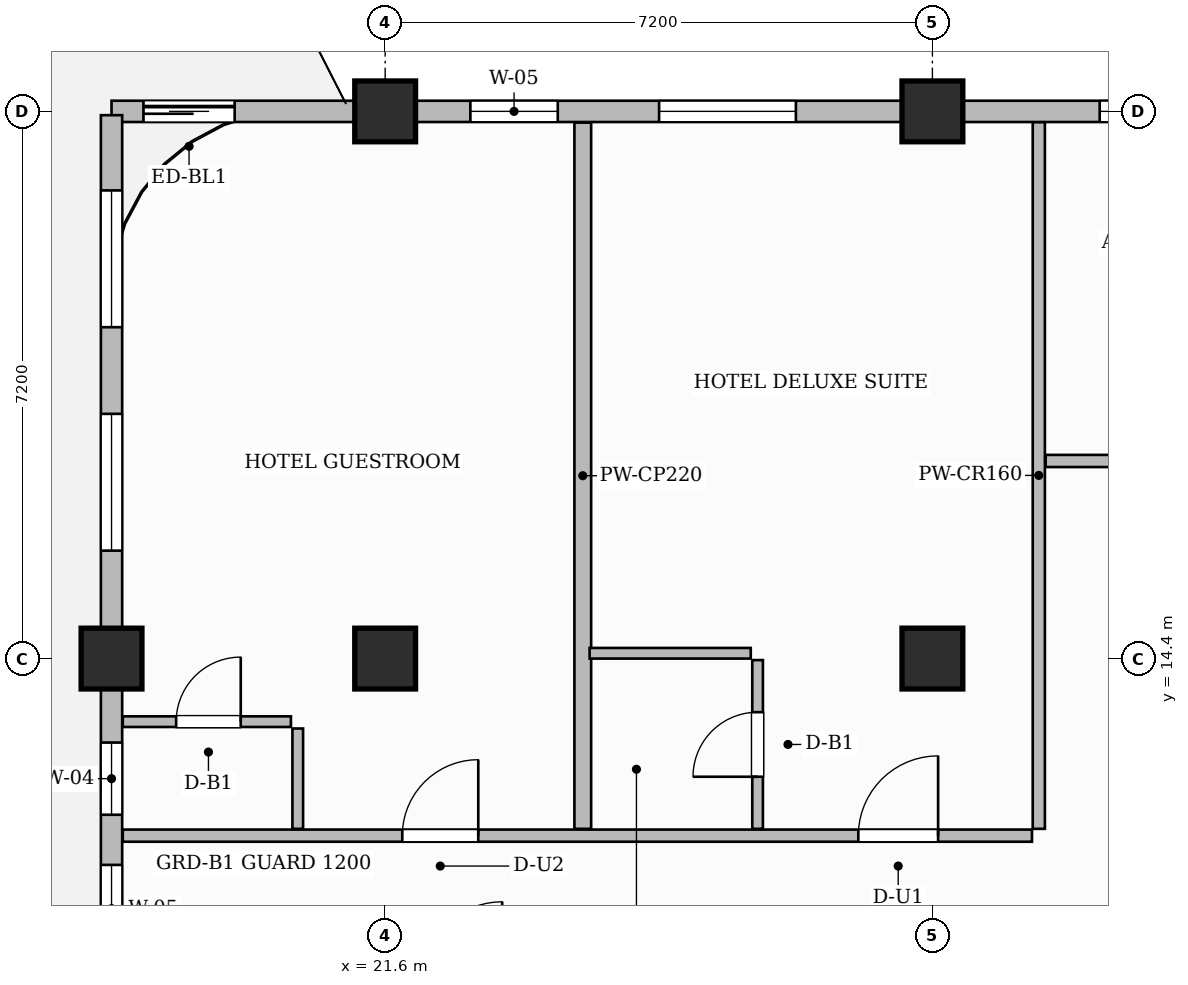
"""IFC4 building model, lengths in metres.
Left out: names, types, materials, properties, quantities, classifications, styles, units other than length and angle.
Written with IfcOpenShell. Run it as: python <this file> out.ifc"""

import sys

from ifc_helpers import new_model, si_unit, direction, frame, frame_2d, origin, origin_2d, place, context, subcontext, project, spatial, rectangle, extrude, source, transform, mapped, element, fill, save


model = new_model("IFC4")
c1 = context("Model", 3, precision=1e-05, world=origin(), true_north=direction((0.0, 1.0)))
c2 = subcontext(c1, "Body", "Model", "MODEL_VIEW")
j1 = project(units=[si_unit("LENGTHUNIT", "METRE"), si_unit("PLANEANGLEUNIT", "RADIAN")], contexts=[c1])
p1 = place(None, origin())
s1 = spatial("IfcSite", under=j1, at=p1, CompositionType="ELEMENT")
p2 = place(p1, origin())
s2 = spatial("IfcBuilding", under=s1, at=p2, CompositionType="ELEMENT")
p3 = place(p2, frame((0.0, 0.0, 259.65)))
s3 = spatial("IfcBuildingStorey", under=s2, at=p3, CompositionType="ELEMENT", Elevation=259.65)
m1 = source(origin(), c2, "Body", "SweptSolid", [
    extrude(rectangle(XDim=0.8, YDim=0.8, at=origin_2d()), origin(), (0.0, 0.0, 1.0), 3.85),
])
for number, where, z_axis, x_axis in (
    (1, (21.6, 14.4, 0.0), (0.0, 0.0, 1.0), (1.0, 0.0, 0.0)),
    (2, (21.6, 21.6, 0.0), (0.0, 0.0, 1.0), (1.0, 0.0, 0.0)),
    (3, (28.8, 14.4, 0.0), (0.0, 0.0, 1.0), (1.0, 0.0, 0.0)),
    (4, (28.8, 21.6, 0.0), (0.0, 0.0, 1.0), (1.0, 0.0, 0.0)),
    (5, (18.0, 14.4, 0.0), (0.0, 0.0, 1.0), (1.0, 0.0, 0.0)),
):
    element("IfcColumn", number, at=place(p3, frame(where, z_axis=z_axis, x_axis=x_axis)), inside=s3, PredefinedType="COLUMN", context=c2, shape_type="MappedRepresentation", body=[
        mapped(m1, transform((0.0, 0.0, 0.0), scale=1.0)),
    ])
p4 = place(p3, frame((18.148, 12.07, 0.0), z_axis=(0.0, 0.0, 1.0), x_axis=(1.0, 0.0, 0.0)))
e6 = element("IfcWall", 6, at=p4, inside=s3, PredefinedType="PARTITIONING", context=c2, shape_type="SweptSolid", body=[
    extrude(rectangle(XDim=11.962, YDim=0.16, at=frame_2d((5.981, 0.0))), origin(), (0.0, 0.0, 1.0), 3.6),
])
p5 = place(p4, frame((3.677, 0.0, 0.0)))
e7 = element("IfcOpeningElement", 7, at=p5, cuts=e6, PredefinedType="OPENING", context=c2, shape_type="SweptSolid", body=[
    extrude(rectangle(XDim=1.0, YDim=2.2, at=frame_2d((0.5, 1.1))), frame((0.0, 0.09, 0.0), z_axis=(0.0, -1.0, 0.0), x_axis=(1.0, 0.0, 0.0)), (0.0, 0.0, 1.0), 0.18),
])
p6 = place(p4, frame((9.677, 0.0, 0.0)))
e8 = element("IfcOpeningElement", 8, at=p6, cuts=e6, PredefinedType="OPENING", context=c2, shape_type="SweptSolid", body=[
    extrude(rectangle(XDim=1.05, YDim=2.25, at=frame_2d((0.525, 1.125))), frame((0.0, 0.09, 0.0), z_axis=(0.0, -1.0, 0.0), x_axis=(1.0, 0.0, 0.0)), (0.0, 0.0, 1.0), 0.18),
])
p7 = place(p3, frame((30.2, 12.16, 0.0), z_axis=(0.0, 0.0, 1.0), x_axis=(0.0, 1.0, 0.0)))
e9 = element("IfcWall", 9, at=p7, inside=s3, PredefinedType="PARTITIONING", context=c2, shape_type="SweptSolid", body=[
    extrude(rectangle(XDim=9.3, YDim=0.16, at=frame_2d((4.65, 0.0))), origin(), (0.0, 0.0, 1.0), 3.6),
])
p8 = place(p3, frame((30.29, 17.0, 0.0), z_axis=(0.0, 0.0, 1.0), x_axis=(1.0, 0.0, 0.0)))
e10 = element("IfcWall", 10, at=p8, inside=s3, PredefinedType="PARTITIONING", context=c2, shape_type="SweptSolid", body=[
    extrude(rectangle(XDim=19.37, YDim=0.16, at=frame_2d((9.685, 0.0))), origin(), (0.0, 0.0, 1.0), 3.6),
])
p9 = place(p8, frame((1.185, 0.0, 0.0)))
e11 = element("IfcOpeningElement", 11, at=p9, cuts=e10, PredefinedType="OPENING", context=c2, shape_type="SweptSolid", body=[
    extrude(rectangle(XDim=0.85, YDim=2.1, at=frame_2d((0.425, 1.05))), frame((0.0, 0.09, 0.0), z_axis=(0.0, -1.0, 0.0), x_axis=(1.0, 0.0, 0.0)), (0.0, 0.0, 1.0), 0.18),
])
p10 = place(p8, frame((6.66, 0.0, 0.0)))
e12 = element("IfcOpeningElement", 12, at=p10, cuts=e10, PredefinedType="OPENING", context=c2, shape_type="SweptSolid", body=[
    extrude(rectangle(XDim=0.9, YDim=2.15, at=frame_2d((0.45, 1.075))), frame((0.0, 0.09, 0.0), z_axis=(0.0, -1.0, 0.0), x_axis=(1.0, 0.0, 0.0)), (0.0, 0.0, 1.0), 0.18),
])
p11 = place(p8, frame((14.46, 0.0, 0.0)))
e13 = element("IfcOpeningElement", 13, at=p11, cuts=e10, PredefinedType="OPENING", context=c2, shape_type="SweptSolid", body=[
    extrude(rectangle(XDim=1.4, YDim=2.35, at=frame_2d((0.7, 1.175))), frame((0.0, 0.09, 0.0), z_axis=(0.0, -1.0, 0.0), x_axis=(1.0, 0.0, 0.0)), (0.0, 0.0, 1.0), 0.18),
])
p12 = place(p3, frame((24.2, 12.16, 0.0), z_axis=(0.0, 0.0, 1.0), x_axis=(0.0, 1.0, 0.0)))
e14 = element("IfcWall", 14, at=p12, inside=s3, PredefinedType="PARTITIONING", context=c2, shape_type="SweptSolid", body=[
    extrude(rectangle(XDim=9.292, YDim=0.22, at=frame_2d((4.646, 0.0))), origin(), (0.0, 0.0, 1.0), 3.6),
])
p13 = place(p3, frame((20.45, 12.16, 0.0), z_axis=(0.0, 0.0, 1.0), x_axis=(0.0, 1.0, 0.0)))
e15 = element("IfcWall", 15, at=p13, inside=s3, PredefinedType="PARTITIONING", context=c2, shape_type="SweptSolid", body=[
    extrude(rectangle(XDim=1.32, YDim=0.14, at=frame_2d((0.66, 0.0))), origin(), (0.0, 0.0, 1.0), 3.6),
])
p14 = place(p3, frame((18.148, 13.57, 0.0), z_axis=(0.0, 0.0, 1.0), x_axis=(1.0, 0.0, 0.0)))
e16 = element("IfcWall", 16, at=p14, inside=s3, PredefinedType="PARTITIONING", context=c2, shape_type="SweptSolid", body=[
    extrude(rectangle(XDim=2.212, YDim=0.14, at=frame_2d((1.106, 0.0))), origin(), (0.0, 0.0, 1.0), 3.6),
])
p15 = place(p14, frame((0.702, 0.0, 0.0)))
e17 = element("IfcOpeningElement", 17, at=p15, cuts=e16, PredefinedType="OPENING", context=c2, shape_type="SweptSolid", body=[
    extrude(rectangle(XDim=0.85, YDim=2.1, at=frame_2d((0.425, 1.05))), frame((0.0, 0.08, 0.0), z_axis=(0.0, -1.0, 0.0), x_axis=(1.0, 0.0, 0.0)), (0.0, 0.0, 1.0), 0.16),
])
p16 = place(p3, frame((26.5, 12.16, 0.0), z_axis=(0.0, 0.0, 1.0), x_axis=(0.0, 1.0, 0.0)))
e18 = element("IfcWall", 18, at=p16, inside=s3, PredefinedType="PARTITIONING", context=c2, shape_type="SweptSolid", body=[
    extrude(rectangle(XDim=2.22, YDim=0.14, at=frame_2d((1.11, 0.0))), origin(), (0.0, 0.0, 1.0), 3.6),
])
p17 = place(p16, frame((0.685, 0.0, 0.0)))
e19 = element("IfcOpeningElement", 19, at=p17, cuts=e18, PredefinedType="OPENING", context=c2, shape_type="SweptSolid", body=[
    extrude(rectangle(XDim=0.85, YDim=2.1, at=frame_2d((0.425, 1.05))), frame((0.0, 0.08, 0.0), z_axis=(0.0, -1.0, 0.0), x_axis=(1.0, 0.0, 0.0)), (0.0, 0.0, 1.0), 0.16),
])
p18 = place(p3, frame((24.29, 14.47, 0.0), z_axis=(0.0, 0.0, 1.0), x_axis=(1.0, 0.0, 0.0)))
e20 = element("IfcWall", 20, at=p18, inside=s3, PredefinedType="PARTITIONING", context=c2, shape_type="SweptSolid", body=[
    extrude(rectangle(XDim=2.12, YDim=0.14, at=frame_2d((1.06, 0.0))), origin(), (0.0, 0.0, 1.0), 3.185),
])
p19 = place(p3, frame((18.0, 21.6, 0.0), z_axis=(0.0, 0.0, 1.0), x_axis=(1.0, 0.0, 0.0)))
e21 = element("IfcWall", 21, at=p19, inside=s3, PredefinedType="SOLIDWALL", context=c2, shape_type="SweptSolid", body=[
    extrude(rectangle(XDim=31.8, YDim=0.28, at=frame_2d((15.9, 0.0))), origin(), (0.0, 0.0, 1.0), 3.185),
])
p20 = place(p19, frame((0.42, 0.0, 0.0)))
e22 = element("IfcOpeningElement", 22, at=p20, cuts=e21, PredefinedType="OPENING", context=c2, shape_type="SweptSolid", body=[
    extrude(rectangle(XDim=1.2, YDim=2.2, at=frame_2d((0.6, 1.1))), frame((0.0, 0.15, 0.0), z_axis=(0.0, -1.0, 0.0), x_axis=(1.0, 0.0, 0.0)), (0.0, 0.0, 1.0), 0.3),
])
p21 = place(p19, frame((4.721, 0.0, 0.8)))
e23 = element("IfcOpeningElement", 23, at=p21, cuts=e21, PredefinedType="OPENING", context=c2, shape_type="SweptSolid", body=[
    extrude(rectangle(XDim=1.15, YDim=1.8, at=frame_2d((0.575, 0.9))), frame((0.0, 0.15, 0.0), z_axis=(0.0, -1.0, 0.0), x_axis=(1.0, 0.0, 0.0)), (0.0, 0.0, 1.0), 0.3),
])
p22 = place(p19, frame((7.204, 0.0, 0.8)))
e24 = element("IfcOpeningElement", 24, at=p22, cuts=e21, PredefinedType="OPENING", context=c2, shape_type="SweptSolid", body=[
    extrude(rectangle(XDim=1.8, YDim=1.85, at=frame_2d((0.9, 0.925))), frame((0.0, 0.15, 0.0), z_axis=(0.0, -1.0, 0.0), x_axis=(1.0, 0.0, 0.0)), (0.0, 0.0, 1.0), 0.3),
])
p23 = place(p19, frame((13.001, 0.0, 0.8)))
e25 = element("IfcOpeningElement", 25, at=p23, cuts=e21, PredefinedType="OPENING", context=c2, shape_type="SweptSolid", body=[
    extrude(rectangle(XDim=1.8, YDim=1.85, at=frame_2d((0.9, 0.925))), frame((0.0, 0.15, 0.0), z_axis=(0.0, -1.0, 0.0), x_axis=(1.0, 0.0, 0.0)), (0.0, 0.0, 1.0), 0.3),
])
p24 = place(p19, frame((18.123, 0.0, 0.8)))
e26 = element("IfcOpeningElement", 26, at=p24, cuts=e21, PredefinedType="OPENING", context=c2, shape_type="SweptSolid", body=[
    extrude(rectangle(XDim=1.8, YDim=1.85, at=frame_2d((0.9, 0.925))), frame((0.0, 0.15, 0.0), z_axis=(0.0, -1.0, 0.0), x_axis=(1.0, 0.0, 0.0)), (0.0, 0.0, 1.0), 0.3),
])
p25 = place(p19, frame((20.869, 0.0, 0.8)))
e27 = element("IfcOpeningElement", 27, at=p25, cuts=e21, PredefinedType="OPENING", context=c2, shape_type="SweptSolid", body=[
    extrude(rectangle(XDim=1.8, YDim=1.85, at=frame_2d((0.9, 0.925))), frame((0.0, 0.15, 0.0), z_axis=(0.0, -1.0, 0.0), x_axis=(1.0, 0.0, 0.0)), (0.0, 0.0, 1.0), 0.3),
])
p26 = place(p19, frame((25.475, 0.0, 0.8)))
e28 = element("IfcOpeningElement", 28, at=p26, cuts=e21, PredefinedType="OPENING", context=c2, shape_type="SweptSolid", body=[
    extrude(rectangle(XDim=1.8, YDim=1.85, at=frame_2d((0.9, 0.925))), frame((0.0, 0.15, 0.0), z_axis=(0.0, -1.0, 0.0), x_axis=(1.0, 0.0, 0.0)), (0.0, 0.0, 1.0), 0.3),
])
p27 = place(p19, frame((28.525, 0.0, 0.8)))
e29 = element("IfcOpeningElement", 29, at=p27, cuts=e21, PredefinedType="OPENING", context=c2, shape_type="SweptSolid", body=[
    extrude(rectangle(XDim=1.8, YDim=1.85, at=frame_2d((0.9, 0.925))), frame((0.0, 0.15, 0.0), z_axis=(0.0, -1.0, 0.0), x_axis=(1.0, 0.0, 0.0)), (0.0, 0.0, 1.0), 0.3),
])
p28 = place(p3, frame((18.0, 0.05, 0.0), z_axis=(0.0, 0.0, 1.0), x_axis=(0.0, 1.0, 0.0)))
e30 = element("IfcWall", 30, at=p28, inside=s3, PredefinedType="SOLIDWALL", context=c2, shape_type="SweptSolid", body=[
    extrude(rectangle(XDim=21.5, YDim=0.28, at=frame_2d((10.75, 0.0))), origin(), (0.0, 0.0, 1.0), 3.6),
])
p29 = place(p28, frame((1.831, 0.0, 0.8)))
e31 = element("IfcOpeningElement", 31, at=p29, cuts=e30, PredefinedType="OPENING", context=c2, shape_type="SweptSolid", body=[
    extrude(rectangle(XDim=1.8, YDim=1.85, at=frame_2d((0.9, 0.925))), frame((0.0, 0.15, 0.0), z_axis=(0.0, -1.0, 0.0), x_axis=(1.0, 0.0, 0.0)), (0.0, 0.0, 1.0), 0.3),
])
p30 = place(p28, frame((8.321, 0.0, 0.8)))
e32 = element("IfcOpeningElement", 32, at=p30, cuts=e30, PredefinedType="OPENING", context=c2, shape_type="SweptSolid", body=[
    extrude(rectangle(XDim=1.4, YDim=1.85, at=frame_2d((0.7, 0.925))), frame((0.0, 0.15, 0.0), z_axis=(0.0, -1.0, 0.0), x_axis=(1.0, 0.0, 0.0)), (0.0, 0.0, 1.0), 0.3),
])
p31 = place(p28, frame((10.485, 0.0, 0.8)))
e33 = element("IfcOpeningElement", 33, at=p31, cuts=e30, PredefinedType="OPENING", context=c2, shape_type="SweptSolid", body=[
    extrude(rectangle(XDim=1.15, YDim=1.8, at=frame_2d((0.575, 0.9))), frame((0.0, 0.15, 0.0), z_axis=(0.0, -1.0, 0.0), x_axis=(1.0, 0.0, 0.0)), (0.0, 0.0, 1.0), 0.3),
])
p32 = place(p28, frame((12.295, 0.0, 0.8)))
e34 = element("IfcOpeningElement", 34, at=p32, cuts=e30, PredefinedType="OPENING", context=c2, shape_type="SweptSolid", body=[
    extrude(rectangle(XDim=0.95, YDim=1.75, at=frame_2d((0.475, 0.875))), frame((0.0, 0.15, 0.0), z_axis=(0.0, -1.0, 0.0), x_axis=(1.0, 0.0, 0.0)), (0.0, 0.0, 1.0), 0.3),
])
p33 = place(p28, frame((15.77, 0.0, 0.8)))
e35 = element("IfcOpeningElement", 35, at=p33, cuts=e30, PredefinedType="OPENING", context=c2, shape_type="SweptSolid", body=[
    extrude(rectangle(XDim=1.8, YDim=1.85, at=frame_2d((0.9, 0.925))), frame((0.0, 0.15, 0.0), z_axis=(0.0, -1.0, 0.0), x_axis=(1.0, 0.0, 0.0)), (0.0, 0.0, 1.0), 0.3),
])
p34 = place(p28, frame((18.71, 0.0, 0.8)))
e36 = element("IfcOpeningElement", 36, at=p34, cuts=e30, PredefinedType="OPENING", context=c2, shape_type="SweptSolid", body=[
    extrude(rectangle(XDim=1.8, YDim=1.85, at=frame_2d((0.9, 0.925))), frame((0.0, 0.15, 0.0), z_axis=(0.0, -1.0, 0.0), x_axis=(1.0, 0.0, 0.0)), (0.0, 0.0, 1.0), 0.3),
])
m2 = source(origin(), c2, "Body", "SweptSolid", [
    extrude(rectangle(XDim=0.85, YDim=2.1, at=frame_2d((0.425, 1.05))), frame((0.0, 0.025, 0.0), z_axis=(0.0, -1.0, 0.0), x_axis=(1.0, 0.0, 0.0)), (0.0, 0.0, 1.0), 0.05),
])
p35 = place(p15, origin())
e37 = element("IfcDoor", 37, at=p35, inside=s3, OperationType="SINGLE_SWING_RIGHT", PredefinedType="DOOR", context=c2, shape_type="MappedRepresentation", body=[
    mapped(m2, transform((0.0, 0.0, 0.0), scale=1.0)),
])
fill(e17, e37)
m3 = source(origin(), c2, "Body", "SweptSolid", [
    extrude(rectangle(XDim=1.0, YDim=2.2, at=frame_2d((0.5, 1.1))), frame((0.0, 0.025, 0.0), z_axis=(0.0, -1.0, 0.0), x_axis=(1.0, 0.0, 0.0)), (0.0, 0.0, 1.0), 0.05),
])
p36 = place(p5, origin())
e38 = element("IfcDoor", 38, at=p36, inside=s3, OperationType="SINGLE_SWING_RIGHT", PredefinedType="DOOR", context=c2, shape_type="MappedRepresentation", body=[
    mapped(m3, transform((0.0, 0.0, 0.0), scale=1.0)),
])
fill(e7, e38)
p37 = place(p17, origin())
e39 = element("IfcDoor", 39, at=p37, inside=s3, OperationType="SINGLE_SWING_LEFT", PredefinedType="DOOR", context=c2, shape_type="MappedRepresentation", body=[
    mapped(m2, transform((0.0, 0.0, 0.0), scale=1.0)),
])
fill(e19, e39)
m4 = source(origin(), c2, "Body", "SweptSolid", [
    extrude(rectangle(XDim=1.05, YDim=2.25, at=frame_2d((0.525, 1.125))), frame((0.0, 0.025, 0.0), z_axis=(0.0, -1.0, 0.0), x_axis=(1.0, 0.0, 0.0)), (0.0, 0.0, 1.0), 0.05),
])
p38 = place(p6, origin())
e40 = element("IfcDoor", 40, at=p38, inside=s3, OperationType="SINGLE_SWING_RIGHT", PredefinedType="DOOR", context=c2, shape_type="MappedRepresentation", body=[
    mapped(m4, transform((0.0, 0.0, 0.0), scale=1.0)),
])
fill(e8, e40)
m5 = source(origin(), c2, "Body", "SweptSolid", [
    extrude(rectangle(XDim=1.2, YDim=2.2, at=frame_2d((0.6, 1.1))), frame((0.0, 0.025, 0.0), z_axis=(0.0, -1.0, 0.0), x_axis=(1.0, 0.0, 0.0)), (0.0, 0.0, 1.0), 0.05),
])
p39 = place(p20, origin())
e41 = element("IfcDoor", 41, at=p39, inside=s3, OperationType="SLIDING_TO_LEFT", PredefinedType="DOOR", context=c2, shape_type="MappedRepresentation", body=[
    mapped(m5, transform((0.0, 0.0, 0.0), scale=1.0)),
])
fill(e22, e41)
m6 = source(origin(), c2, "Body", "SweptSolid", [
    extrude(rectangle(XDim=1.15, YDim=1.8, at=frame_2d((0.575, 0.9))), frame((0.0, 0.03, 0.0), z_axis=(0.0, -1.0, 0.0), x_axis=(1.0, 0.0, 0.0)), (0.0, 0.0, 1.0), 0.06),
])
p40 = place(p21, origin())
e42 = element("IfcWindow", 42, at=p40, inside=s3, PartitioningType="SINGLE_PANEL", PredefinedType="WINDOW", context=c2, shape_type="MappedRepresentation", body=[
    mapped(m6, transform((0.0, 0.0, 0.0), scale=1.0)),
])
fill(e23, e42)
m7 = source(origin(), c2, "Body", "SweptSolid", [
    extrude(rectangle(XDim=1.8, YDim=1.85, at=frame_2d((0.9, 0.925))), frame((0.0, 0.03, 0.0), z_axis=(0.0, -1.0, 0.0), x_axis=(1.0, 0.0, 0.0)), (0.0, 0.0, 1.0), 0.06),
])
p41 = place(p22, origin())
e43 = element("IfcWindow", 43, at=p41, inside=s3, PartitioningType="DOUBLE_PANEL_VERTICAL", PredefinedType="WINDOW", context=c2, shape_type="MappedRepresentation", body=[
    mapped(m7, transform((0.0, 0.0, 0.0), scale=1.0)),
])
fill(e24, e43)
p42 = place(p23, origin())
e44 = element("IfcWindow", 44, at=p42, inside=s3, PartitioningType="DOUBLE_PANEL_VERTICAL", PredefinedType="WINDOW", context=c2, shape_type="MappedRepresentation", body=[
    mapped(m7, transform((0.0, 0.0, 0.0), scale=1.0)),
])
fill(e25, e44)
p43 = place(p31, origin())
e45 = element("IfcWindow", 45, at=p43, inside=s3, PartitioningType="SINGLE_PANEL", PredefinedType="WINDOW", context=c2, shape_type="MappedRepresentation", body=[
    mapped(m6, transform((0.0, 0.0, 0.0), scale=1.0)),
])
fill(e33, e45)
m8 = source(origin(), c2, "Body", "SweptSolid", [
    extrude(rectangle(XDim=0.95, YDim=1.75, at=frame_2d((0.475, 0.875))), frame((0.0, 0.03, 0.0), z_axis=(0.0, -1.0, 0.0), x_axis=(1.0, 0.0, 0.0)), (0.0, 0.0, 1.0), 0.06),
])
p44 = place(p32, origin())
e46 = element("IfcWindow", 46, at=p44, inside=s3, PartitioningType="SINGLE_PANEL", PredefinedType="WINDOW", context=c2, shape_type="MappedRepresentation", body=[
    mapped(m8, transform((0.0, 0.0, 0.0), scale=1.0)),
])
fill(e34, e46)
p45 = place(p33, origin())
e47 = element("IfcWindow", 47, at=p45, inside=s3, PartitioningType="DOUBLE_PANEL_VERTICAL", PredefinedType="WINDOW", context=c2, shape_type="MappedRepresentation", body=[
    mapped(m7, transform((0.0, 0.0, 0.0), scale=1.0)),
])
fill(e35, e47)
p46 = place(p34, origin())
e48 = element("IfcWindow", 48, at=p46, inside=s3, PartitioningType="DOUBLE_PANEL_VERTICAL", PredefinedType="WINDOW", context=c2, shape_type="MappedRepresentation", body=[
    mapped(m7, transform((0.0, 0.0, 0.0), scale=1.0)),
])
fill(e36, e48)
save(model, sys.argv[1])
